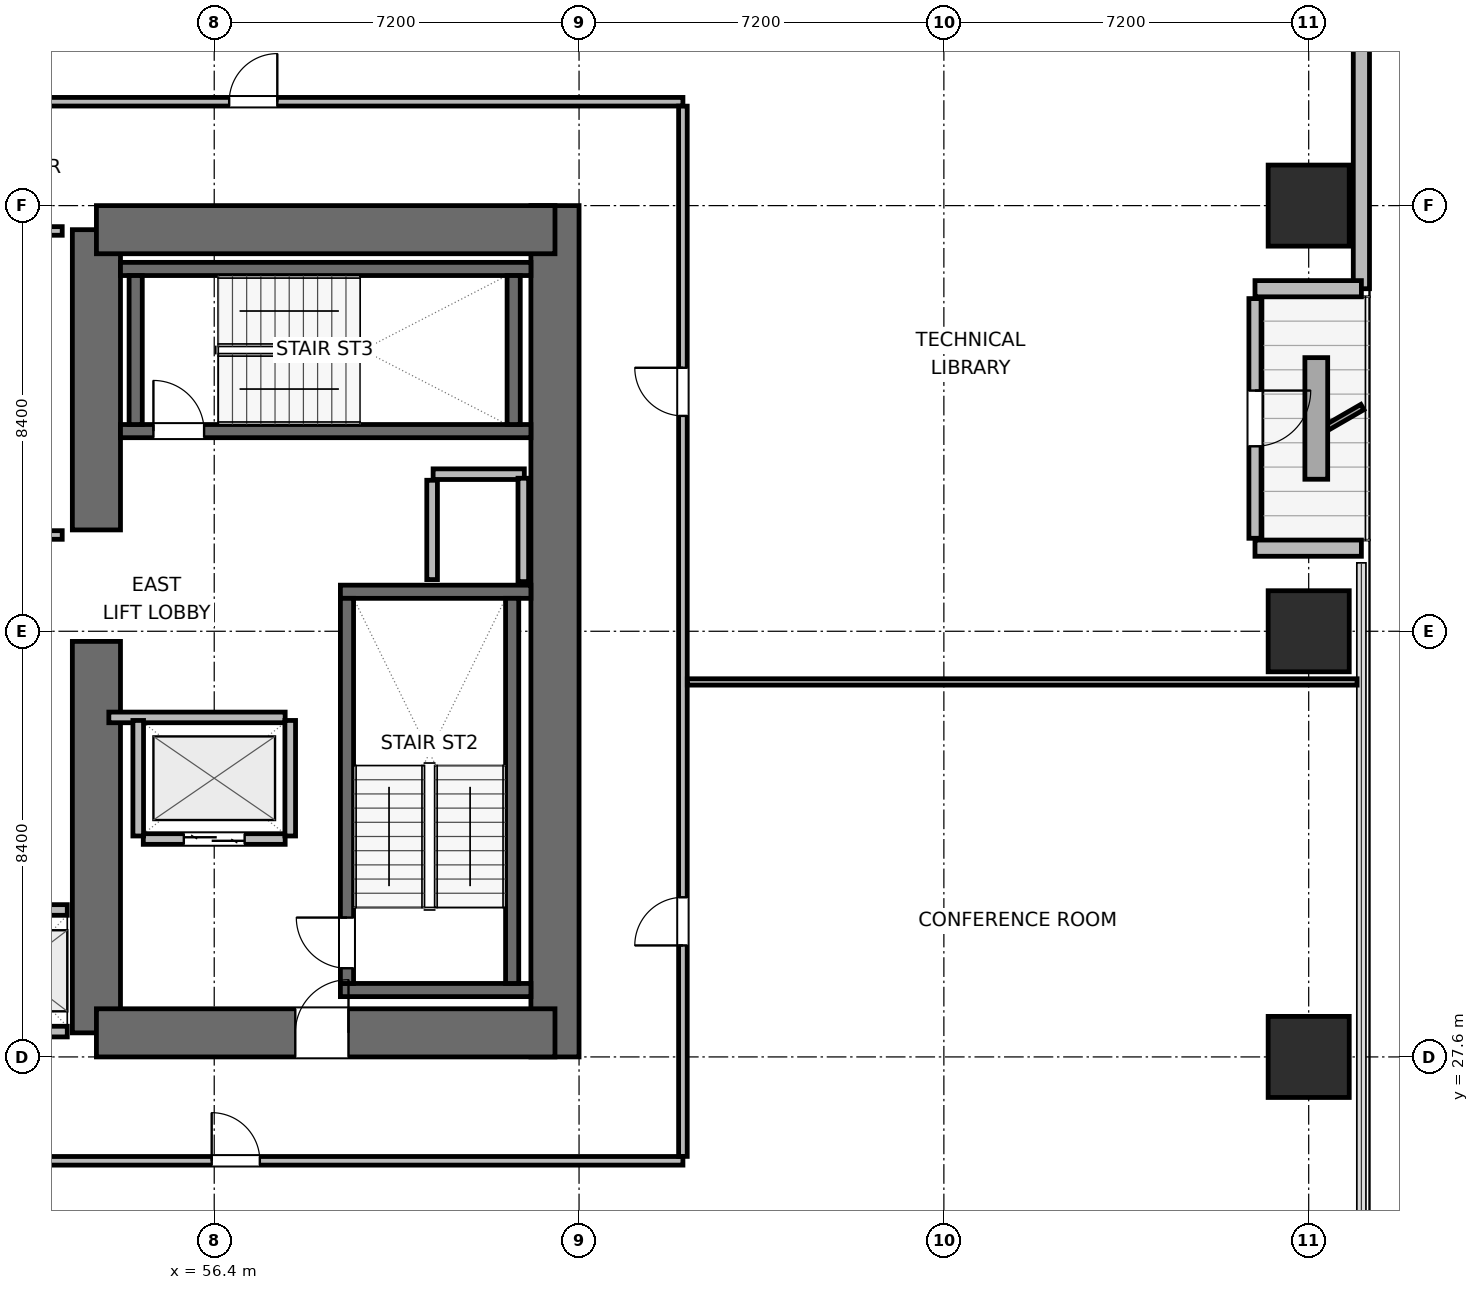
"""IFC4 building model, lengths in metres.
Left out: names, types, materials, properties, quantities, classifications, styles, units other than length and angle.
Written with IfcOpenShell. Run it as: python <this file> out.ifc"""

import sys

from ifc_helpers import new_model, si_unit, direction, frame, frame_2d, origin, origin_2d, place, context, subcontext, project, spatial, rectangle, extrude, element, fill, save


model = new_model("IFC4")
c1 = context("Model", 3, precision=1e-05, world=origin(), true_north=direction((0.0, 1.0)))
c2 = subcontext(c1, "Body", "Model", "MODEL_VIEW")
j1 = project(units=[si_unit("LENGTHUNIT", "METRE"), si_unit("PLANEANGLEUNIT", "RADIAN")], contexts=[c1])
p1 = place(None, origin())
s1 = spatial("IfcSite", under=j1, at=p1, CompositionType="ELEMENT")
p2 = place(p1, origin())
s2 = spatial("IfcBuilding", under=s1, at=p2, CompositionType="ELEMENT")
p3 = place(p2, frame((0.0, 0.0, 29.4)))
s3 = spatial("IfcBuildingStorey", under=s2, at=p3, CompositionType="ELEMENT", Elevation=29.4)
p4 = place(p3, frame((54.075, 28.075, 0.0), z_axis=(0.0, 0.0, 1.0), x_axis=(0.0, 1.0, 0.0)))
e1 = element("IfcWall", 1, at=p4, inside=s3, PredefinedType="SHEAR", context=c2, shape_type="SweptSolid", body=[
    extrude(rectangle(XDim=7.725, YDim=0.95, at=frame_2d((3.863, 0.0))), origin(), (0.0, 0.0, 1.0), 3.9),
])
p5 = place(p3, frame((54.075, 38.0, 0.0), z_axis=(0.0, 0.0, 1.0), x_axis=(0.0, 1.0, 0.0)))
e2 = element("IfcWall", 2, at=p5, inside=s3, PredefinedType="SHEAR", context=c2, shape_type="SweptSolid", body=[
    extrude(rectangle(XDim=5.925, YDim=0.95, at=frame_2d((2.962, 0.0))), origin(), (0.0, 0.0, 1.0), 3.9),
])
p6 = place(p3, frame((63.125, 27.6, 0.0), z_axis=(0.0, 0.0, 1.0), x_axis=(0.0, 1.0, 0.0)))
e3 = element("IfcWall", 3, at=p6, inside=s3, PredefinedType="SHEAR", context=c2, shape_type="SweptSolid", body=[
    extrude(rectangle(XDim=16.8, YDim=0.95, at=frame_2d((8.4, 0.0))), origin(), (0.0, 0.0, 1.0), 3.9),
])
p7 = place(p3, frame((54.075, 28.075, 0.0), z_axis=(0.0, 0.0, 1.0), x_axis=(1.0, 0.0, 0.0)))
e4 = element("IfcWall", 4, at=p7, inside=s3, PredefinedType="SHEAR", context=c2, shape_type="SweptSolid", body=[
    extrude(rectangle(XDim=9.05, YDim=0.95, at=frame_2d((4.525, 0.0))), origin(), (0.0, 0.0, 1.0), 3.9),
])
p8 = place(p7, frame((3.925, 0.0, 0.0)))
e5 = element("IfcOpeningElement", 5, at=p8, cuts=e4, PredefinedType="OPENING", context=c2, shape_type="SweptSolid", body=[
    extrude(rectangle(XDim=1.05, YDim=2.04, at=frame_2d((0.525, 1.02))), frame((0.0, 0.485, 0.0), z_axis=(0.0, -1.0, 0.0), x_axis=(1.0, 0.0, 0.0)), (0.0, 0.0, 1.0), 0.97),
])
p9 = place(p3, frame((54.075, 43.925, 0.0), z_axis=(0.0, 0.0, 1.0), x_axis=(1.0, 0.0, 0.0)))
e6 = element("IfcWall", 6, at=p9, inside=s3, PredefinedType="SHEAR", context=c2, shape_type="SweptSolid", body=[
    extrude(rectangle(XDim=9.05, YDim=0.95, at=frame_2d((4.525, 0.0))), origin(), (0.0, 0.0, 1.0), 3.9),
])
for number, where, z_axis, x_axis in (
    (7, (58.89, 28.92, 0.0), (0.0, 0.0, 1.0), (1.0, 0.0, 0.0)),
    (8, (58.89, 36.78, 0.0), (0.0, 0.0, 1.0), (1.0, 0.0, 0.0)),
):
    element("IfcWall", number, at=place(p3, frame(where, z_axis=z_axis, x_axis=x_axis)), inside=s3, PredefinedType="SHEAR", context=c2, shape_type="SweptSolid", body=[
        extrude(rectangle(XDim=3.76, YDim=0.26, at=frame_2d((1.88, 0.0))), origin(), (0.0, 0.0, 1.0), 3.9),
    ])
p10 = place(p3, frame((59.02, 29.05, 0.0), z_axis=(0.0, 0.0, 1.0), x_axis=(0.0, 1.0, 0.0)))
e9 = element("IfcWall", 9, at=p10, inside=s3, PredefinedType="SHEAR", context=c2, shape_type="SweptSolid", body=[
    extrude(rectangle(XDim=7.6, YDim=0.26, at=frame_2d((3.8, 0.0))), origin(), (0.0, 0.0, 1.0), 3.9),
])
p11 = place(p10, frame((0.3, 0.0, 0.0)))
e10 = element("IfcOpeningElement", 10, at=p11, cuts=e9, PredefinedType="OPENING", context=c2, shape_type="SweptSolid", body=[
    extrude(rectangle(XDim=1.0, YDim=2.04, at=frame_2d((0.5, 1.02))), frame((0.0, 0.14, 0.0), z_axis=(0.0, -1.0, 0.0), x_axis=(1.0, 0.0, 0.0)), (0.0, 0.0, 1.0), 0.28),
])
p12 = place(p3, frame((62.28, 29.05, 0.0), z_axis=(0.0, 0.0, 1.0), x_axis=(0.0, 1.0, 0.0)))
e11 = element("IfcWall", 11, at=p12, inside=s3, PredefinedType="SHEAR", context=c2, shape_type="SweptSolid", body=[
    extrude(rectangle(XDim=7.6, YDim=0.26, at=frame_2d((3.8, 0.0))), origin(), (0.0, 0.0, 1.0), 3.9),
])
p13 = place(p3, frame((54.55, 39.95, 0.0), z_axis=(0.0, 0.0, 1.0), x_axis=(1.0, 0.0, 0.0)))
e12 = element("IfcWall", 12, at=p13, inside=s3, PredefinedType="SHEAR", context=c2, shape_type="SweptSolid", body=[
    extrude(rectangle(XDim=8.1, YDim=0.26, at=frame_2d((4.05, 0.0))), origin(), (0.0, 0.0, 1.0), 3.9),
])
p14 = place(p13, frame((0.65, 0.0, 0.0)))
e13 = element("IfcOpeningElement", 13, at=p14, cuts=e12, PredefinedType="OPENING", context=c2, shape_type="SweptSolid", body=[
    extrude(rectangle(XDim=1.0, YDim=2.04, at=frame_2d((0.5, 1.02))), frame((0.0, 0.14, 0.0), z_axis=(0.0, -1.0, 0.0), x_axis=(1.0, 0.0, 0.0)), (0.0, 0.0, 1.0), 0.28),
])
p15 = place(p3, frame((54.55, 43.15, 0.0), z_axis=(0.0, 0.0, 1.0), x_axis=(1.0, 0.0, 0.0)))
e14 = element("IfcWall", 14, at=p15, inside=s3, PredefinedType="SHEAR", context=c2, shape_type="SweptSolid", body=[
    extrude(rectangle(XDim=8.1, YDim=0.26, at=frame_2d((4.05, 0.0))), origin(), (0.0, 0.0, 1.0), 3.9),
])
for number, where, z_axis, x_axis in (
    (15, (54.85, 40.08, 0.0), (0.0, 0.0, 1.0), (0.0, 1.0, 0.0)),
    (16, (62.31, 40.08, 0.0), (0.0, 0.0, 1.0), (0.0, 1.0, 0.0)),
):
    element("IfcWall", number, at=place(p3, frame(where, z_axis=z_axis, x_axis=x_axis)), inside=s3, PredefinedType="SHEAR", context=c2, shape_type="SweptSolid", body=[
        extrude(rectangle(XDim=2.94, YDim=0.26, at=frame_2d((1.47, 0.0))), origin(), (0.0, 0.0, 1.0), 3.9),
    ])
for number, where, z_axis, x_axis in (
    (17, (78.0, 27.6, 0.0), (0.0, 0.0, 1.0), (1.0, 0.0, 0.0)),
    (18, (78.0, 36.0, 0.0), (0.0, 0.0, 1.0), (1.0, 0.0, 0.0)),
    (19, (78.0, 44.4, 0.0), (0.0, 0.0, 1.0), (1.0, 0.0, 0.0)),
):
    element("IfcColumn", number, at=place(p3, frame(where, z_axis=z_axis, x_axis=x_axis)), inside=s3, PredefinedType="COLUMN", context=c2, shape_type="SweptSolid", body=[
        extrude(rectangle(XDim=1.6, YDim=1.6, at=origin_2d()), origin(), (0.0, 0.0, 1.0), 3.9),
    ])
p16 = place(p3, frame((79.04, 56.979, 0.0), z_axis=(0.0, 0.0, 1.0), x_axis=(0.0, -1.0, 0.0)))
e20 = element("IfcWall", 20, at=p16, inside=s3, PredefinedType="SOLIDWALL", context=c2, shape_type="SweptSolid", body=[
    extrude(rectangle(XDim=14.219, YDim=0.32, at=frame_2d((7.109, 0.0))), origin(), (0.0, 0.0, 1.0), 3.64),
])
p17 = place(p3, frame((79.04, 42.76, 0.0), z_axis=(0.0, 0.0, 1.0), x_axis=(-1.0, 0.0, 0.0)))
e21 = element("IfcWall", 21, at=p17, inside=s3, PredefinedType="SOLIDWALL", context=c2, shape_type="SweptSolid", body=[
    extrude(rectangle(XDim=2.1, YDim=0.32, at=frame_2d((1.05, 0.0))), origin(), (0.0, 0.0, 1.0), 2.875),
])
p18 = place(p3, frame((76.94, 42.565, 0.0), z_axis=(0.0, 0.0, 1.0), x_axis=(0.0, -1.0, 0.0)))
e22 = element("IfcWall", 22, at=p18, inside=s3, PredefinedType="SOLIDWALL", context=c2, shape_type="SweptSolid", body=[
    extrude(rectangle(XDim=4.73, YDim=0.24, at=frame_2d((2.365, 0.0))), origin(), (0.0, 0.0, 1.0), 3.162),
])
p19 = place(p18, frame((1.815, 0.0, 0.0)))
e23 = element("IfcOpeningElement", 23, at=p19, cuts=e22, PredefinedType="OPENING", context=c2, shape_type="SweptSolid", body=[
    extrude(rectangle(XDim=1.1, YDim=2.04, at=frame_2d((0.55, 1.02))), frame((0.0, 0.13, 0.0), z_axis=(0.0, -1.0, 0.0), x_axis=(1.0, 0.0, 0.0)), (0.0, 0.0, 1.0), 0.26),
])
p20 = place(p3, frame((76.94, 37.64, 0.0), z_axis=(0.0, 0.0, 1.0), x_axis=(1.0, 0.0, 0.0)))
e24 = element("IfcWall", 24, at=p20, inside=s3, PredefinedType="SOLIDWALL", context=c2, shape_type="SweptSolid", body=[
    extrude(rectangle(XDim=2.1, YDim=0.32, at=frame_2d((1.05, 0.0))), origin(), (0.0, 0.0, 1.0), 2.875),
])
p21 = place(p3, frame((60.72, 39.1, 0.0), z_axis=(0.0, 0.0, 1.0), x_axis=(1.0, 0.0, 0.0)))
e25 = element("IfcWall", 25, at=p21, inside=s3, PredefinedType="PARTITIONING", context=c2, shape_type="SweptSolid", body=[
    extrude(rectangle(XDim=1.8, YDim=0.21, at=frame_2d((0.9, 0.0))), origin(), (0.0, 0.0, 1.0), 3.64),
])
p22 = place(p3, frame((60.7, 37.02, 0.0), z_axis=(0.0, 0.0, 1.0), x_axis=(0.0, 1.0, 0.0)))
e26 = element("IfcWall", 26, at=p22, inside=s3, PredefinedType="PARTITIONING", context=c2, shape_type="SweptSolid", body=[
    extrude(rectangle(XDim=1.96, YDim=0.21, at=frame_2d((0.98, 0.0))), origin(), (0.0, 0.0, 1.0), 3.64),
])
p23 = place(p3, frame((62.5, 36.98, 0.0), z_axis=(0.0, 0.0, 1.0), x_axis=(0.0, 1.0, 0.0)))
e27 = element("IfcWall", 27, at=p23, inside=s3, PredefinedType="PARTITIONING", context=c2, shape_type="SweptSolid", body=[
    extrude(rectangle(XDim=2.04, YDim=0.21, at=frame_2d((1.02, 0.0))), origin(), (0.0, 0.0, 1.0), 3.64),
])
p24 = place(p3, frame((55.0, 31.9, 0.0), z_axis=(0.0, 0.0, 1.0), x_axis=(1.0, 0.0, 0.0)))
e28 = element("IfcWall", 28, at=p24, inside=s3, PredefinedType="PARTITIONING", context=c2, shape_type="SweptSolid", body=[
    extrude(rectangle(XDim=2.8, YDim=0.21, at=frame_2d((1.4, 0.0))), origin(), (0.0, 0.0, 1.0), 3.64),
])
p25 = place(p24, frame((0.8, 0.0, 0.0)))
e29 = element("IfcOpeningElement", 29, at=p25, cuts=e28, PredefinedType="OPENING", context=c2, shape_type="SweptSolid", body=[
    extrude(rectangle(XDim=1.2, YDim=2.04, at=frame_2d((0.6, 1.02))), frame((0.0, 0.115, 0.0), z_axis=(0.0, -1.0, 0.0), x_axis=(1.0, 0.0, 0.0)), (0.0, 0.0, 1.0), 0.23),
])
p26 = place(p3, frame((54.32, 34.3, 0.0), z_axis=(0.0, 0.0, 1.0), x_axis=(1.0, 0.0, 0.0)))
e30 = element("IfcWall", 30, at=p26, inside=s3, PredefinedType="PARTITIONING", context=c2, shape_type="SweptSolid", body=[
    extrude(rectangle(XDim=3.48, YDim=0.21, at=frame_2d((1.74, 0.0))), origin(), (0.0, 0.0, 1.0), 3.64),
])
for number, where, z_axis, x_axis in (
    (31, (54.9, 31.96, 0.0), (0.0, 0.0, 1.0), (0.0, 1.0, 0.0)),
    (32, (57.9, 31.96, 0.0), (0.0, 0.0, 1.0), (0.0, 1.0, 0.0)),
):
    element("IfcWall", number, at=place(p3, frame(where, z_axis=z_axis, x_axis=x_axis)), inside=s3, PredefinedType="PARTITIONING", context=c2, shape_type="SweptSolid", body=[
        extrude(rectangle(XDim=2.28, YDim=0.21, at=frame_2d((1.14, 0.0))), origin(), (0.0, 0.0, 1.0), 3.64),
    ])
p27 = place(p3, frame((51.4, 30.5, 0.0), z_axis=(0.0, 0.0, 1.0), x_axis=(1.0, 0.0, 0.0)))
e33 = element("IfcWall", 33, at=p27, inside=s3, PredefinedType="PARTITIONING", context=c2, shape_type="SweptSolid", body=[
    extrude(rectangle(XDim=2.1, YDim=0.21, at=frame_2d((1.05, 0.0))), origin(), (0.0, 0.0, 1.0), 3.64),
])
p28 = place(p27, frame((0.5, 0.0, 0.0)))
e34 = element("IfcOpeningElement", 34, at=p28, cuts=e33, PredefinedType="OPENING", context=c2, shape_type="SweptSolid", body=[
    extrude(rectangle(XDim=1.1, YDim=2.04, at=frame_2d((0.55, 1.02))), frame((0.0, 0.115, 0.0), z_axis=(0.0, -1.0, 0.0), x_axis=(1.0, 0.0, 0.0)), (0.0, 0.0, 1.0), 0.23),
])
p29 = place(p3, frame((51.4, 28.1, 0.0), z_axis=(0.0, 0.0, 1.0), x_axis=(1.0, 0.0, 0.0)))
e35 = element("IfcWall", 35, at=p29, inside=s3, PredefinedType="PARTITIONING", context=c2, shape_type="SweptSolid", body=[
    extrude(rectangle(XDim=2.1, YDim=0.21, at=frame_2d((1.05, 0.0))), origin(), (0.0, 0.0, 1.0), 2.525),
])
p30 = place(p3, frame((49.287, 37.9, 0.0), z_axis=(0.0, 0.0, 1.0), x_axis=(1.0, 0.0, 0.0)))
e36 = element("IfcWall", 36, at=p30, inside=s3, PredefinedType="PARTITIONING", context=c2, shape_type="SweptSolid", body=[
    extrude(rectangle(XDim=4.113, YDim=0.17, at=frame_2d((2.056, 0.0))), origin(), (0.0, 0.0, 1.0), 3.64),
])
p31 = place(p3, frame((49.287, 43.9, 0.0), z_axis=(0.0, 0.0, 1.0), x_axis=(1.0, 0.0, 0.0)))
e37 = element("IfcWall", 37, at=p31, inside=s3, PredefinedType="PARTITIONING", context=c2, shape_type="SweptSolid", body=[
    extrude(rectangle(XDim=4.113, YDim=0.17, at=frame_2d((2.056, 0.0))), origin(), (0.0, 0.0, 1.0), 2.525),
])
p32 = place(p3, frame((30.35, 25.55, 0.0), z_axis=(0.0, 0.0, 1.0), x_axis=(1.0, 0.0, 0.0)))
e38 = element("IfcWall", 38, at=p32, inside=s3, PredefinedType="PARTITIONING", context=c2, shape_type="SweptSolid", body=[
    extrude(rectangle(XDim=35.3, YDim=0.17, at=frame_2d((17.65, 0.0))), origin(), (0.0, 0.0, 1.0), 3.64),
])
p33 = place(p32, frame((8.35, 0.0, 0.0)))
e39 = element("IfcOpeningElement", 39, at=p33, cuts=e38, PredefinedType="OPENING", context=c2, shape_type="SweptSolid", body=[
    extrude(rectangle(XDim=0.95, YDim=2.04, at=frame_2d((0.475, 1.02))), frame((0.0, 0.095, 0.0), z_axis=(0.0, -1.0, 0.0), x_axis=(1.0, 0.0, 0.0)), (0.0, 0.0, 1.0), 0.19),
])
p34 = place(p32, frame((26.0, 0.0, 0.0)))
e40 = element("IfcOpeningElement", 40, at=p34, cuts=e38, PredefinedType="OPENING", context=c2, shape_type="SweptSolid", body=[
    extrude(rectangle(XDim=0.95, YDim=2.04, at=frame_2d((0.475, 1.02))), frame((0.0, 0.095, 0.0), z_axis=(0.0, -1.0, 0.0), x_axis=(1.0, 0.0, 0.0)), (0.0, 0.0, 1.0), 0.19),
])
p35 = place(p3, frame((30.35, 46.45, 0.0), z_axis=(0.0, 0.0, 1.0), x_axis=(1.0, 0.0, 0.0)))
e41 = element("IfcWall", 41, at=p35, inside=s3, PredefinedType="PARTITIONING", context=c2, shape_type="SweptSolid", body=[
    extrude(rectangle(XDim=35.3, YDim=0.17, at=frame_2d((17.65, 0.0))), origin(), (0.0, 0.0, 1.0), 3.64),
])
p36 = place(p35, frame((6.21, 0.0, 0.0)))
e42 = element("IfcOpeningElement", 42, at=p36, cuts=e41, PredefinedType="OPENING", context=c2, shape_type="SweptSolid", body=[
    extrude(rectangle(XDim=0.95, YDim=2.04, at=frame_2d((0.475, 1.02))), frame((0.0, 0.095, 0.0), z_axis=(0.0, -1.0, 0.0), x_axis=(1.0, 0.0, 0.0)), (0.0, 0.0, 1.0), 0.19),
])
p37 = place(p35, frame((15.38, 0.0, 0.0)))
e43 = element("IfcOpeningElement", 43, at=p37, cuts=e41, PredefinedType="OPENING", context=c2, shape_type="SweptSolid", body=[
    extrude(rectangle(XDim=0.95, YDim=2.04, at=frame_2d((0.475, 1.02))), frame((0.0, 0.095, 0.0), z_axis=(0.0, -1.0, 0.0), x_axis=(1.0, 0.0, 0.0)), (0.0, 0.0, 1.0), 0.19),
])
p38 = place(p35, frame((26.345, 0.0, 0.0)))
e44 = element("IfcOpeningElement", 44, at=p38, cuts=e41, PredefinedType="OPENING", context=c2, shape_type="SweptSolid", body=[
    extrude(rectangle(XDim=0.95, YDim=2.04, at=frame_2d((0.475, 1.02))), frame((0.0, 0.095, 0.0), z_axis=(0.0, -1.0, 0.0), x_axis=(1.0, 0.0, 0.0)), (0.0, 0.0, 1.0), 0.19),
])
p39 = place(p3, frame((65.65, 25.637, 0.0), z_axis=(0.0, 0.0, 1.0), x_axis=(0.0, 1.0, 0.0)))
e45 = element("IfcWall", 45, at=p39, inside=s3, PredefinedType="PARTITIONING", context=c2, shape_type="SweptSolid", body=[
    extrude(rectangle(XDim=20.726, YDim=0.17, at=frame_2d((10.363, 0.0))), origin(), (0.0, 0.0, 1.0), 3.64),
])
p40 = place(p39, frame((4.163, 0.0, 0.0)))
e46 = element("IfcOpeningElement", 46, at=p40, cuts=e45, PredefinedType="OPENING", context=c2, shape_type="SweptSolid", body=[
    extrude(rectangle(XDim=0.95, YDim=2.04, at=frame_2d((0.475, 1.02))), frame((0.0, 0.095, 0.0), z_axis=(0.0, -1.0, 0.0), x_axis=(1.0, 0.0, 0.0)), (0.0, 0.0, 1.0), 0.19),
])
p41 = place(p39, frame((14.613, 0.0, 0.0)))
e47 = element("IfcOpeningElement", 47, at=p41, cuts=e45, PredefinedType="OPENING", context=c2, shape_type="SweptSolid", body=[
    extrude(rectangle(XDim=0.95, YDim=2.04, at=frame_2d((0.475, 1.02))), frame((0.0, 0.095, 0.0), z_axis=(0.0, -1.0, 0.0), x_axis=(1.0, 0.0, 0.0)), (0.0, 0.0, 1.0), 0.19),
])
p42 = place(p3, frame((65.737, 35.0, 0.0), z_axis=(0.0, 0.0, 1.0), x_axis=(1.0, 0.0, 0.0)))
e48 = element("IfcWall", 48, at=p42, inside=s3, PredefinedType="PARTITIONING", context=c2, shape_type="SweptSolid", body=[
    extrude(rectangle(XDim=13.218, YDim=0.125, at=frame_2d((6.609, 0.0))), origin(), (0.0, 0.0, 1.0), 3.64),
])
p43 = place(p19, origin())
e49 = element("IfcDoor", 49, at=p43, inside=s3, OperationType="SINGLE_SWING_LEFT", PredefinedType="DOOR", context=c2, shape_type="SweptSolid", body=[
    extrude(rectangle(XDim=1.1, YDim=2.04, at=frame_2d((0.55, 1.02))), frame((0.0, 0.025, 0.0), z_axis=(0.0, -1.0, 0.0), x_axis=(1.0, 0.0, 0.0)), (0.0, 0.0, 1.0), 0.05),
])
fill(e23, e49)
p44 = place(p11, origin())
e50 = element("IfcDoor", 50, at=p44, inside=s3, OperationType="SINGLE_SWING_RIGHT", PredefinedType="DOOR", context=c2, shape_type="SweptSolid", body=[
    extrude(rectangle(XDim=1.0, YDim=2.04, at=frame_2d((0.5, 1.02))), frame((0.0, 0.025, 0.0), z_axis=(0.0, -1.0, 0.0), x_axis=(1.0, 0.0, 0.0)), (0.0, 0.0, 1.0), 0.05),
])
fill(e10, e50)
p45 = place(p14, origin())
e51 = element("IfcDoor", 51, at=p45, inside=s3, OperationType="SINGLE_SWING_LEFT", PredefinedType="DOOR", context=c2, shape_type="SweptSolid", body=[
    extrude(rectangle(XDim=1.0, YDim=2.04, at=frame_2d((0.5, 1.02))), frame((0.0, 0.025, 0.0), z_axis=(0.0, -1.0, 0.0), x_axis=(1.0, 0.0, 0.0)), (0.0, 0.0, 1.0), 0.05),
])
fill(e13, e51)
p46 = place(p25, origin())
e52 = element("IfcDoor", 52, at=p46, inside=s3, OperationType="DOUBLE_DOOR_SLIDING", PredefinedType="DOOR", context=c2, shape_type="SweptSolid", body=[
    extrude(rectangle(XDim=1.2, YDim=2.04, at=frame_2d((0.6, 1.02))), frame((0.0, 0.025, 0.0), z_axis=(0.0, -1.0, 0.0), x_axis=(1.0, 0.0, 0.0)), (0.0, 0.0, 1.0), 0.05),
])
fill(e29, e52)
p47 = place(p8, origin())
e53 = element("IfcDoor", 53, at=p47, inside=s3, OperationType="SINGLE_SWING_RIGHT", PredefinedType="DOOR", context=c2, shape_type="SweptSolid", body=[
    extrude(rectangle(XDim=1.05, YDim=2.04, at=frame_2d((0.525, 1.02))), frame((0.0, 0.025, 0.0), z_axis=(0.0, -1.0, 0.0), x_axis=(1.0, 0.0, 0.0)), (0.0, 0.0, 1.0), 0.05),
])
fill(e5, e53)
p48 = place(p34, origin())
e54 = element("IfcDoor", 54, at=p48, inside=s3, OperationType="SINGLE_SWING_LEFT", PredefinedType="DOOR", context=c2, shape_type="SweptSolid", body=[
    extrude(rectangle(XDim=0.95, YDim=2.04, at=frame_2d((0.475, 1.02))), frame((0.0, 0.025, 0.0), z_axis=(0.0, -1.0, 0.0), x_axis=(1.0, 0.0, 0.0)), (0.0, 0.0, 1.0), 0.05),
])
fill(e40, e54)
p49 = place(p38, origin())
e55 = element("IfcDoor", 55, at=p49, inside=s3, OperationType="SINGLE_SWING_RIGHT", PredefinedType="DOOR", context=c2, shape_type="SweptSolid", body=[
    extrude(rectangle(XDim=0.95, YDim=2.04, at=frame_2d((0.475, 1.02))), frame((0.0, 0.025, 0.0), z_axis=(0.0, -1.0, 0.0), x_axis=(1.0, 0.0, 0.0)), (0.0, 0.0, 1.0), 0.05),
])
fill(e44, e55)
p50 = place(p40, origin())
e56 = element("IfcDoor", 56, at=p50, inside=s3, OperationType="SINGLE_SWING_LEFT", PredefinedType="DOOR", context=c2, shape_type="SweptSolid", body=[
    extrude(rectangle(XDim=0.95, YDim=2.04, at=frame_2d((0.475, 1.02))), frame((0.0, 0.025, 0.0), z_axis=(0.0, -1.0, 0.0), x_axis=(1.0, 0.0, 0.0)), (0.0, 0.0, 1.0), 0.05),
])
fill(e46, e56)
p51 = place(p41, origin())
e57 = element("IfcDoor", 57, at=p51, inside=s3, OperationType="SINGLE_SWING_RIGHT", PredefinedType="DOOR", context=c2, shape_type="SweptSolid", body=[
    extrude(rectangle(XDim=0.95, YDim=2.04, at=frame_2d((0.475, 1.02))), frame((0.0, 0.025, 0.0), z_axis=(0.0, -1.0, 0.0), x_axis=(1.0, 0.0, 0.0)), (0.0, 0.0, 1.0), 0.05),
])
fill(e47, e57)
save(model, sys.argv[1])
